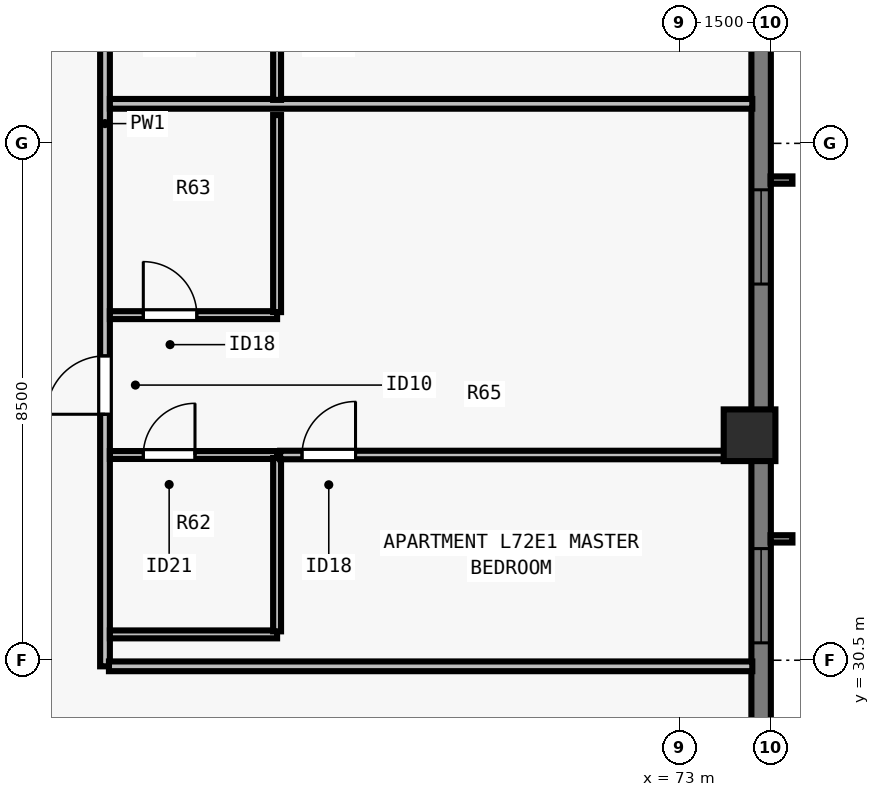
"""IFC4 building model, lengths in metres.
Left out: names, types, materials, properties, quantities, classifications, styles, units other than length and angle.
Written with IfcOpenShell. Run it as: python <this file> out.ifc"""

import sys

from ifc_helpers import new_model, si_unit, direction, frame, frame_2d, origin, origin_2d, place, context, subcontext, project, spatial, rectangle, extrude, element, fill, save


model = new_model("IFC4")
c1 = context("Model", 3, precision=1e-05, world=origin(), true_north=direction((0.0, 1.0)))
c2 = subcontext(c1, "Body", "Model", "MODEL_VIEW")
j1 = project(units=[si_unit("LENGTHUNIT", "METRE"), si_unit("PLANEANGLEUNIT", "RADIAN")], contexts=[c1])
p1 = place(None, origin())
s1 = spatial("IfcSite", under=j1, at=p1, CompositionType="ELEMENT")
p2 = place(p1, origin())
s2 = spatial("IfcBuilding", under=s1, at=p2, CompositionType="ELEMENT")
p3 = place(p2, frame((0.0, 0.0, 262.0)))
s3 = spatial("IfcBuildingStorey", under=s2, at=p3, CompositionType="ELEMENT", Elevation=262.0)
p4 = place(p3, frame((74.15, 34.2, 0.0), z_axis=(0.0, 0.0, 1.0), x_axis=(0.0, 1.0, 0.0)))
e1 = element("IfcColumn", 1, at=p4, inside=s3, PredefinedType="COLUMN", context=c2, shape_type="SweptSolid", body=[
    extrude(rectangle(XDim=0.85, YDim=0.85, at=origin_2d()), origin(), (0.0, 0.0, 1.0), 3.5),
])
p5 = place(p3, frame((74.34, 56.5, 0.0), z_axis=(0.0, 0.0, 1.0), x_axis=(0.0, -1.0, 0.0)))
e2 = element("IfcWall", 2, at=p5, inside=s3, PredefinedType="SOLIDWALL", context=c2, shape_type="SweptSolid", body=[
    extrude(rectangle(XDim=34.702, YDim=0.32, at=frame_2d((17.351, 0.0))), origin(), (0.0, 0.0, 1.0), 3.29),
])
p6 = place(p5, frame((6.738, 0.0, 0.8)))
e3 = element("IfcOpeningElement", 3, at=p6, cuts=e2, PredefinedType="OPENING", context=c2, shape_type="SweptSolid", body=[
    extrude(rectangle(XDim=1.85, YDim=1.678, at=frame_2d((0.925, 0.839))), frame((0.0, 0.17, 0.0), z_axis=(0.0, -1.0, 0.0), x_axis=(1.0, 0.0, 0.0)), (0.0, 0.0, 1.0), 0.34),
])
p7 = place(p5, frame((10.263, 0.0, 0.8)))
e4 = element("IfcOpeningElement", 4, at=p7, cuts=e2, PredefinedType="OPENING", context=c2, shape_type="SweptSolid", body=[
    extrude(rectangle(XDim=1.55, YDim=1.678, at=frame_2d((0.775, 0.839))), frame((0.0, 0.17, 0.0), z_axis=(0.0, -1.0, 0.0), x_axis=(1.0, 0.0, 0.0)), (0.0, 0.0, 1.0), 0.34),
])
p8 = place(p5, frame((18.264, 0.0, 0.8)))
e5 = element("IfcOpeningElement", 5, at=p8, cuts=e2, PredefinedType="OPENING", context=c2, shape_type="SweptSolid", body=[
    extrude(rectangle(XDim=1.55, YDim=1.678, at=frame_2d((0.775, 0.839))), frame((0.0, 0.17, 0.0), z_axis=(0.0, -1.0, 0.0), x_axis=(1.0, 0.0, 0.0)), (0.0, 0.0, 1.0), 0.34),
])
p9 = place(p5, frame((24.164, 0.0, 0.8)))
e6 = element("IfcOpeningElement", 6, at=p9, cuts=e2, PredefinedType="OPENING", context=c2, shape_type="SweptSolid", body=[
    extrude(rectangle(XDim=1.55, YDim=1.678, at=frame_2d((0.775, 0.839))), frame((0.0, 0.17, 0.0), z_axis=(0.0, -1.0, 0.0), x_axis=(1.0, 0.0, 0.0)), (0.0, 0.0, 1.0), 0.34),
])
p10 = place(p5, frame((14.39, 0.0, 0.8)))
e7 = element("IfcOpeningElement", 7, at=p10, cuts=e2, PredefinedType="OPENING", context=c2, shape_type="SweptSolid", body=[
    extrude(rectangle(XDim=0.9, YDim=1.678, at=frame_2d((0.45, 0.839))), frame((0.0, 0.17, 0.0), z_axis=(0.0, -1.0, 0.0), x_axis=(1.0, 0.0, 0.0)), (0.0, 0.0, 1.0), 0.34),
])
p11 = place(p3, frame((63.55, 30.4, 0.0), z_axis=(0.0, 0.0, 1.0), x_axis=(0.0, 1.0, 0.0)))
e8 = element("IfcWall", 8, at=p11, inside=s3, PredefinedType="PARTITIONING", context=c2, shape_type="SweptSolid", body=[
    extrude(rectangle(XDim=17.2, YDim=0.16, at=frame_2d((8.6, 0.0))), origin(), (0.0, 0.0, 1.0), 3.29),
])
p12 = place(p11, frame((4.145, 0.0, 0.0)))
e9 = element("IfcOpeningElement", 9, at=p12, cuts=e8, PredefinedType="OPENING", context=c2, shape_type="SweptSolid", body=[
    extrude(rectangle(XDim=0.96, YDim=2.18, at=frame_2d((0.48, 1.09))), frame((0.0, 0.09, 0.0), z_axis=(0.0, -1.0, 0.0), x_axis=(1.0, 0.0, 0.0)), (0.0, 0.0, 1.0), 0.18),
])
p13 = place(p11, frame((12.745, 0.0, 0.0)))
e10 = element("IfcOpeningElement", 10, at=p13, cuts=e8, PredefinedType="OPENING", context=c2, shape_type="SweptSolid", body=[
    extrude(rectangle(XDim=0.96, YDim=2.18, at=frame_2d((0.48, 1.09))), frame((0.0, 0.09, 0.0), z_axis=(0.0, -1.0, 0.0), x_axis=(1.0, 0.0, 0.0)), (0.0, 0.0, 1.0), 0.18),
])
p14 = place(p3, frame((63.615, 30.4, 0.0), z_axis=(0.0, 0.0, 1.0), x_axis=(1.0, 0.0, 0.0)))
e11 = element("IfcWall", 11, at=p14, inside=s3, PredefinedType="PARTITIONING", context=c2, shape_type="SweptSolid", body=[
    extrude(rectangle(XDim=10.58, YDim=0.16, at=frame_2d((5.29, 0.0))), origin(), (0.0, 0.0, 1.0), 3.29),
])
p15 = place(p3, frame((63.63, 39.65, 0.0), z_axis=(0.0, 0.0, 1.0), x_axis=(1.0, 0.0, 0.0)))
e12 = element("IfcWall", 12, at=p15, inside=s3, PredefinedType="PARTITIONING", context=c2, shape_type="SweptSolid", body=[
    extrude(rectangle(XDim=10.565, YDim=0.16, at=frame_2d((5.283, 0.0))), origin(), (0.0, 0.0, 1.0), 3.29),
])
p16 = place(p3, frame((63.63, 30.925, 0.0), z_axis=(0.0, 0.0, 1.0), x_axis=(1.0, 0.0, 0.0)))
e13 = element("IfcWall", 13, at=p16, inside=s3, PredefinedType="PLUMBINGWALL", context=c2, shape_type="SweptSolid", body=[
    extrude(rectangle(XDim=2.75, YDim=0.13, at=frame_2d((1.375, 0.0))), origin(), (0.0, 0.0, 1.0), 3.29),
])
p17 = place(p3, frame((63.63, 33.875, 0.0), z_axis=(0.0, 0.0, 1.0), x_axis=(1.0, 0.0, 0.0)))
e14 = element("IfcWall", 14, at=p17, inside=s3, PredefinedType="PLUMBINGWALL", context=c2, shape_type="SweptSolid", body=[
    extrude(rectangle(XDim=2.75, YDim=0.13, at=frame_2d((1.375, 0.0))), origin(), (0.0, 0.0, 1.0), 3.29),
])
p18 = place(p17, frame((0.55, 0.0, 0.0)))
e15 = element("IfcOpeningElement", 15, at=p18, cuts=e14, PredefinedType="OPENING", context=c2, shape_type="SweptSolid", body=[
    extrude(rectangle(XDim=0.85, YDim=2.08, at=frame_2d((0.425, 1.04))), frame((0.0, 0.075, 0.0), z_axis=(0.0, -1.0, 0.0), x_axis=(1.0, 0.0, 0.0)), (0.0, 0.0, 1.0), 0.15),
])
p19 = place(p3, frame((66.38, 30.975, 0.0), z_axis=(0.0, 0.0, 1.0), x_axis=(0.0, 1.0, 0.0)))
e16 = element("IfcWall", 16, at=p19, inside=s3, PredefinedType="PLUMBINGWALL", context=c2, shape_type="SweptSolid", body=[
    extrude(rectangle(XDim=2.85, YDim=0.13, at=frame_2d((1.425, 0.0))), origin(), (0.0, 0.0, 1.0), 3.29),
])
p20 = place(p3, frame((63.63, 36.175, 0.0), z_axis=(0.0, 0.0, 1.0), x_axis=(1.0, 0.0, 0.0)))
e17 = element("IfcWall", 17, at=p20, inside=s3, PredefinedType="PLUMBINGWALL", context=c2, shape_type="SweptSolid", body=[
    extrude(rectangle(XDim=2.75, YDim=0.13, at=frame_2d((1.375, 0.0))), origin(), (0.0, 0.0, 1.0), 3.29),
])
p21 = place(p20, frame((0.55, 0.0, 0.0)))
e18 = element("IfcOpeningElement", 18, at=p21, cuts=e17, PredefinedType="OPENING", context=c2, shape_type="SweptSolid", body=[
    extrude(rectangle(XDim=0.88, YDim=2.1, at=frame_2d((0.44, 1.05))), frame((0.0, 0.075, 0.0), z_axis=(0.0, -1.0, 0.0), x_axis=(1.0, 0.0, 0.0)), (0.0, 0.0, 1.0), 0.15),
])
p22 = place(p3, frame((66.38, 36.225, 0.0), z_axis=(0.0, 0.0, 1.0), x_axis=(0.0, 1.0, 0.0)))
e19 = element("IfcWall", 19, at=p22, inside=s3, PredefinedType="PLUMBINGWALL", context=c2, shape_type="SweptSolid", body=[
    extrude(rectangle(XDim=3.24, YDim=0.13, at=frame_2d((1.62, 0.0))), origin(), (0.0, 0.0, 1.0), 3.29),
])
p23 = place(p3, frame((66.43, 33.875, 0.0), z_axis=(0.0, 0.0, 1.0), x_axis=(1.0, 0.0, 0.0)))
e20 = element("IfcWall", 20, at=p23, inside=s3, PredefinedType="PARTITIONING", context=c2, shape_type="SweptSolid", body=[
    extrude(rectangle(XDim=7.69, YDim=0.14, at=frame_2d((3.845, 0.0))), origin(), (0.0, 0.0, 1.0), 2.573),
])
p24 = place(p23, frame((0.36, 0.0, 0.0)))
e21 = element("IfcOpeningElement", 21, at=p24, cuts=e20, PredefinedType="OPENING", context=c2, shape_type="SweptSolid", body=[
    extrude(rectangle(XDim=0.88, YDim=2.1, at=frame_2d((0.44, 1.05))), frame((0.0, 0.08, 0.0), z_axis=(0.0, -1.0, 0.0), x_axis=(1.0, 0.0, 0.0)), (0.0, 0.0, 1.0), 0.16),
])
p25 = place(p3, frame((66.38, 39.715, 0.0), z_axis=(0.0, 0.0, 1.0), x_axis=(0.0, 1.0, 0.0)))
e22 = element("IfcWall", 22, at=p25, inside=s3, PredefinedType="PLUMBINGWALL", context=c2, shape_type="SweptSolid", body=[
    extrude(rectangle(XDim=2.71, YDim=0.13, at=frame_2d((1.355, 0.0))), origin(), (0.0, 0.0, 1.0), 3.29),
])
p26 = place(p8, origin())
e23 = element("IfcWindow", 23, at=p26, inside=s3, PartitioningType="SINGLE_PANEL", PredefinedType="WINDOW", context=c2, shape_type="SweptSolid", body=[
    extrude(rectangle(XDim=1.55, YDim=1.678, at=frame_2d((0.775, 0.839))), frame((0.0, -0.05, 0.0), z_axis=(0.0, -1.0, 0.0), x_axis=(1.0, 0.0, 0.0)), (0.0, 0.0, 1.0), 0.06),
])
fill(e5, e23)
p27 = place(p9, origin())
e24 = element("IfcWindow", 24, at=p27, inside=s3, PartitioningType="SINGLE_PANEL", PredefinedType="WINDOW", context=c2, shape_type="SweptSolid", body=[
    extrude(rectangle(XDim=1.55, YDim=1.678, at=frame_2d((0.775, 0.839))), frame((0.0, -0.05, 0.0), z_axis=(0.0, -1.0, 0.0), x_axis=(1.0, 0.0, 0.0)), (0.0, 0.0, 1.0), 0.06),
])
fill(e6, e24)
p28 = place(p18, origin())
e25 = element("IfcDoor", 25, at=p28, inside=s3, OperationType="SINGLE_SWING_RIGHT", PredefinedType="DOOR", context=c2, shape_type="SweptSolid", body=[
    extrude(rectangle(XDim=0.85, YDim=2.08, at=frame_2d((0.425, 1.04))), frame((0.0, 0.025, 0.0), z_axis=(0.0, -1.0, 0.0), x_axis=(1.0, 0.0, 0.0)), (0.0, 0.0, 1.0), 0.05),
])
fill(e15, e25)
p29 = place(p21, origin())
e26 = element("IfcDoor", 26, at=p29, inside=s3, OperationType="SINGLE_SWING_LEFT", PredefinedType="DOOR", context=c2, shape_type="SweptSolid", body=[
    extrude(rectangle(XDim=0.88, YDim=2.1, at=frame_2d((0.44, 1.05))), frame((0.0, 0.025, 0.0), z_axis=(0.0, -1.0, 0.0), x_axis=(1.0, 0.0, 0.0)), (0.0, 0.0, 1.0), 0.05),
])
fill(e18, e26)
p30 = place(p24, origin())
e27 = element("IfcDoor", 27, at=p30, inside=s3, OperationType="SINGLE_SWING_RIGHT", PredefinedType="DOOR", context=c2, shape_type="SweptSolid", body=[
    extrude(rectangle(XDim=0.88, YDim=2.1, at=frame_2d((0.44, 1.05))), frame((0.0, 0.025, 0.0), z_axis=(0.0, -1.0, 0.0), x_axis=(1.0, 0.0, 0.0)), (0.0, 0.0, 1.0), 0.05),
])
fill(e21, e27)
p31 = place(p12, origin())
e28 = element("IfcDoor", 28, at=p31, inside=s3, OperationType="SINGLE_SWING_LEFT", PredefinedType="DOOR", context=c2, shape_type="SweptSolid", body=[
    extrude(rectangle(XDim=0.96, YDim=2.18, at=frame_2d((0.48, 1.09))), frame((0.0, 0.025, 0.0), z_axis=(0.0, -1.0, 0.0), x_axis=(1.0, 0.0, 0.0)), (0.0, 0.0, 1.0), 0.05),
])
fill(e9, e28)
save(model, sys.argv[1])
